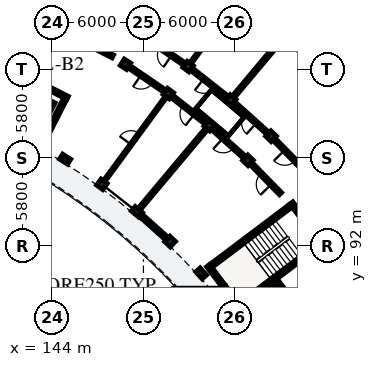
"""IFC4 building model, lengths in metres.
Left out: names, types, materials, properties, quantities, classifications, styles, units other than length and angle.
Written with IfcOpenShell. Run it as: python <this file> out.ifc"""

import sys

from ifc_helpers import new_model, si_unit, direction, frame, frame_2d, origin, origin_2d, place, context, subcontext, project, spatial, rectangle, extrude, element, fill, save


model = new_model("IFC4")
c1 = context("Model", 3, precision=1e-05, world=origin(), true_north=direction((0.0, 1.0)))
c2 = subcontext(c1, "Body", "Model", "MODEL_VIEW")
j1 = project(units=[si_unit("LENGTHUNIT", "METRE"), si_unit("PLANEANGLEUNIT", "RADIAN")], contexts=[c1])
p1 = place(None, origin())
s1 = spatial("IfcSite", under=j1, at=p1, CompositionType="ELEMENT")
p2 = place(p1, origin())
s2 = spatial("IfcBuilding", under=s1, at=p2, CompositionType="ELEMENT")
p3 = place(p2, frame((0.0, 0.0, 29.0)))
s3 = spatial("IfcBuildingStorey", under=s2, at=p3, CompositionType="ELEMENT", Elevation=29.0)
p4 = place(p3, frame((159.707, 94.658, 0.0), z_axis=(0.0, 0.0, 1.0), x_axis=(-0.798639633744, -0.601809550782, 0.0)))
e1 = element("IfcWall", 1, at=p4, inside=s3, PredefinedType="SHEAR", context=c2, shape_type="SweptSolid", body=[
    extrude(rectangle(XDim=6.6, YDim=0.25, at=frame_2d((3.3, 0.0))), origin(), (0.0, 0.0, 1.0), 3.11),
])
p5 = place(p3, frame((154.261, 90.711, 0.0), z_axis=(0.0, 0.0, 1.0), x_axis=(0.601825826579, -0.798627368967, 0.0)))
e2 = element("IfcWall", 2, at=p5, inside=s3, PredefinedType="SHEAR", context=c2, shape_type="SweptSolid", body=[
    extrude(rectangle(XDim=3.42, YDim=0.25, at=frame_2d((1.71, 0.0))), origin(), (0.0, 0.0, 1.0), 3.11),
])
p6 = place(p3, frame((159.731, 94.833, 0.0), z_axis=(0.0, 0.0, 1.0), x_axis=(0.601814606132, -0.798635824294, 0.0)))
e3 = element("IfcWall", 3, at=p6, inside=s3, PredefinedType="SHEAR", context=c2, shape_type="SweptSolid", body=[
    extrude(rectangle(XDim=3.42, YDim=0.25, at=frame_2d((1.71, 0.0))), origin(), (0.0, 0.0, 1.0), 3.11),
])
p7 = place(p3, frame((161.615, 92.126, 0.0), z_axis=(0.0, 0.0, 1.0), x_axis=(-0.798639633744, -0.601809550782, 0.0)))
e4 = element("IfcWall", 4, at=p7, inside=s3, PredefinedType="SHEAR", context=c2, shape_type="SweptSolid", body=[
    extrude(rectangle(XDim=6.6, YDim=0.25, at=frame_2d((3.3, 0.0))), origin(), (0.0, 0.0, 1.0), 3.11),
])
p8 = place(p7, frame((0.22, 0.0, 0.0)))
e5 = element("IfcOpeningElement", 5, at=p8, cuts=e4, PredefinedType="OPENING", context=c2, shape_type="SweptSolid", body=[
    extrude(rectangle(XDim=1.05, YDim=2.15, at=frame_2d((0.525, 1.075))), frame((0.0, 0.135, 0.0), z_axis=(0.0, -1.0, 0.0), x_axis=(1.0, 0.0, 0.0)), (0.0, 0.0, 1.0), 0.27),
])
p9 = place(p3, frame((158.827, 89.619, 0.0), z_axis=(0.0, 0.0, 1.0), x_axis=(0.601819781152, -0.798631924615, 0.0)))
e6 = element("IfcWall", 6, at=p9, inside=s3, PredefinedType="SHEAR", context=c2, shape_type="SweptSolid", body=[
    extrude(rectangle(XDim=3.26, YDim=0.23, at=frame_2d((1.63, 0.0))), origin(), (0.0, 0.0, 1.0), 3.11),
])
p10 = place(p9, frame((0.9, 0.0, 0.0)))
e7 = element("IfcOpeningElement", 7, at=p10, cuts=e6, PredefinedType="OPENING", context=c2, shape_type="SweptSolid", body=[
    extrude(rectangle(XDim=1.1, YDim=2.15, at=frame_2d((0.55, 1.075))), frame((0.0, 0.125, 0.0), z_axis=(0.0, -1.0, 0.0), x_axis=(1.0, 0.0, 0.0)), (0.0, 0.0, 1.0), 0.25),
])
p11 = place(p3, frame((158.805, 89.458, 0.0), z_axis=(0.0, 0.0, 1.0), x_axis=(-0.798608971494, -0.601850239387, 0.0)))
e8 = element("IfcWall", 8, at=p11, inside=s3, PredefinedType="SHEAR", context=c2, shape_type="SweptSolid", body=[
    extrude(rectangle(XDim=2.7, YDim=0.23, at=frame_2d((1.35, 0.0))), origin(), (0.0, 0.0, 1.0), 3.11),
])
p12 = place(p3, frame((142.103, 103.224, 0.0), z_axis=(0.0, 0.0, 1.0), x_axis=(0.891001200497, -0.454000947921, 0.0)))
e9 = element("IfcWall", 9, at=p12, inside=s3, PredefinedType="SHEAR", context=c2, shape_type="SweptSolid", body=[
    extrude(rectangle(XDim=3.26, YDim=0.23, at=frame_2d((1.63, 0.0))), origin(), (0.0, 0.0, 1.0), 3.11),
])
p13 = place(p12, frame((0.9, 0.0, 0.0)))
e10 = element("IfcOpeningElement", 10, at=p13, cuts=e9, PredefinedType="OPENING", context=c2, shape_type="SweptSolid", body=[
    extrude(rectangle(XDim=1.0, YDim=2.15, at=frame_2d((0.5, 1.075))), frame((0.0, 0.125, 0.0), z_axis=(0.0, -1.0, 0.0), x_axis=(1.0, 0.0, 0.0)), (0.0, 0.0, 1.0), 0.25),
])
p14 = place(p3, frame((144.853, 101.694, 0.0), z_axis=(0.0, 0.0, 1.0), x_axis=(-0.454036857101, -0.890982902414, 0.0)))
e11 = element("IfcWall", 11, at=p14, inside=s3, PredefinedType="SHEAR", context=c2, shape_type="SweptSolid", body=[
    extrude(rectangle(XDim=2.7, YDim=0.23, at=frame_2d((1.35, 0.0))), origin(), (0.0, 0.0, 1.0), 3.11),
])
p15 = place(p3, frame((153.801, 90.198, 0.0), z_axis=(0.0, 0.0, 1.0), x_axis=(0.73793204255, 0.674875025896, 0.0)))
e12 = element("IfcColumn", 12, at=p15, inside=s3, PredefinedType="PILASTER", context=c2, shape_type="SweptSolid", body=[
    extrude(rectangle(XDim=0.39, YDim=0.63, at=origin_2d()), origin(), (0.0, 0.0, 1.0), 3.115),
])
for number, where, z_axis, x_axis in (
    (13, (151.753, 92.294, 0.0), (0.0, 0.0, 1.0), (0.692, 0.722, 0.0)),
    (14, (156.873, 97.637, 0.0), (0.0, 0.0, 1.0), (0.692, 0.722, 0.0)),
    (15, (158.395, 99.226, 0.0), (0.0, 0.0, 1.0), (0.692, 0.722, 0.0)),
):
    element("IfcColumn", number, at=place(p3, frame(where, z_axis=z_axis, x_axis=x_axis)), inside=s3, PredefinedType="COLUMN", context=c2, shape_type="SweptSolid", body=[
        extrude(rectangle(XDim=0.5, YDim=0.5, at=origin_2d()), origin(), (0.0, 0.0, 1.0), 3.115),
    ])
p16 = place(p3, frame((149.572, 94.251, 0.0), z_axis=(0.0, 0.0, 1.0), x_axis=(0.642787582947, 0.766044465556, 0.0)))
e16 = element("IfcColumn", 16, at=p16, inside=s3, PredefinedType="PILASTER", context=c2, shape_type="SweptSolid", body=[
    extrude(rectangle(XDim=0.39, YDim=0.63, at=origin_2d()), origin(), (0.0, 0.0, 1.0), 3.115),
])
for number, where, z_axis, x_axis in (
    (17, (154.329, 99.919, 0.0), (0.0, 0.0, 1.0), (0.643, 0.766, 0.0)),
    (18, (155.743, 101.605, 0.0), (0.0, 0.0, 1.0), (0.643, 0.766, 0.0)),
    (19, (147.266, 96.059, 0.0), (0.0, 0.0, 1.0), (0.591, 0.807, 0.0)),
    (20, (151.639, 102.029, 0.0), (0.0, 0.0, 1.0), (0.591, 0.807, 0.0)),
    (21, (152.939, 103.804, 0.0), (0.0, 0.0, 1.0), (0.591, 0.807, 0.0)),
):
    element("IfcColumn", number, at=place(p3, frame(where, z_axis=z_axis, x_axis=x_axis)), inside=s3, PredefinedType="COLUMN", context=c2, shape_type="SweptSolid", body=[
        extrude(rectangle(XDim=0.5, YDim=0.5, at=origin_2d()), origin(), (0.0, 0.0, 1.0), 3.115),
    ])
p17 = place(p3, frame((144.847, 97.712, 0.0), z_axis=(0.0, 0.0, 1.0), x_axis=(0.536481544469, 0.843912052553, 0.0)))
e22 = element("IfcColumn", 22, at=p17, inside=s3, PredefinedType="PILASTER", context=c2, shape_type="SweptSolid", body=[
    extrude(rectangle(XDim=0.39, YDim=0.63, at=origin_2d()), origin(), (0.0, 0.0, 1.0), 3.115),
])
p18 = place(p3, frame((148.817, 103.957, 0.0), z_axis=(0.0, 0.0, 1.0), x_axis=(0.536481544469, 0.843912052553, 0.0)))
e23 = element("IfcColumn", 23, at=p18, inside=s3, PredefinedType="COLUMN", context=c2, shape_type="SweptSolid", body=[
    extrude(rectangle(XDim=0.5, YDim=0.5, at=origin_2d()), origin(), (0.0, 0.0, 1.0), 3.115),
])
p19 = place(p3, frame((162.037, 103.344, 0.0), z_axis=(0.0, 0.0, 1.0), x_axis=(-0.744438243575, 0.667691322021, 0.0)))
e24 = element("IfcWall", 24, at=p19, inside=s3, PredefinedType="SOLIDWALL", context=c2, shape_type="SweptSolid", body=[
    extrude(rectangle(XDim=3.541, YDim=0.24, at=frame_2d((1.77, 0.0))), origin(), (0.0, 0.0, 1.0), 2.355),
])
p20 = place(p19, frame((1.17, 0.0, 0.55)))
e25 = element("IfcOpeningElement", 25, at=p20, cuts=e24, PredefinedType="OPENING", context=c2, shape_type="SweptSolid", body=[
    extrude(rectangle(XDim=1.2, YDim=1.55, at=frame_2d((0.6, 0.775))), frame((0.0, 0.13, 0.0), z_axis=(0.0, -1.0, 0.0), x_axis=(1.0, 0.0, 0.0)), (0.0, 0.0, 1.0), 0.26),
])
p21 = place(p3, frame((151.59, 92.441, 0.0), z_axis=(0.0, 0.0, 1.0), x_axis=(-0.744432975017, 0.667697196121, 0.0)))
e26 = element("IfcWall", 26, at=p21, inside=s3, PredefinedType="SOLIDWALL", context=c2, shape_type="SweptSolid", body=[
    extrude(rectangle(XDim=2.545, YDim=0.24, at=frame_2d((1.272, 0.0))), origin(), (0.0, 0.0, 1.0), 2.355),
])
p22 = place(p21, frame((0.498, 0.0, 0.35)))
e27 = element("IfcOpeningElement", 27, at=p22, cuts=e26, PredefinedType="OPENING", context=c2, shape_type="SweptSolid", body=[
    extrude(rectangle(XDim=1.55, YDim=1.75, at=frame_2d((0.775, 0.875))), frame((0.0, 0.13, 0.0), z_axis=(0.0, -1.0, 0.0), x_axis=(1.0, 0.0, 0.0)), (0.0, 0.0, 1.0), 0.26),
])
p23 = place(p3, frame((143.625, 106.696, 0.0), z_axis=(0.0, 0.0, 1.0), x_axis=(0.891003372311, -0.453996685595, 0.0)))
e28 = element("IfcWall", 28, at=p23, inside=s3, PredefinedType="PARTITIONING", context=c2, shape_type="SweptSolid", body=[
    extrude(rectangle(XDim=4.9, YDim=0.22, at=frame_2d((2.45, 0.0))), origin(), (0.0, 0.0, 1.0), 2.34),
])
p24 = place(p23, frame((1.95, 0.0, 0.0)))
e29 = element("IfcOpeningElement", 29, at=p24, cuts=e28, PredefinedType="OPENING", context=c2, shape_type="SweptSolid", body=[
    extrude(rectangle(XDim=0.98, YDim=2.14, at=frame_2d((0.49, 1.07))), frame((0.0, 0.12, 0.0), z_axis=(0.0, -1.0, 0.0), x_axis=(1.0, 0.0, 0.0)), (0.0, 0.0, 1.0), 0.24),
])
p25 = place(p3, frame((160.641, 96.927, 0.0), z_axis=(0.0, 0.0, 1.0), x_axis=(-0.698787219683, 0.715329589496, 0.0)))
e30 = element("IfcWall", 30, at=p25, inside=s3, PredefinedType="PARTITIONING", context=c2, shape_type="SweptSolid", body=[
    extrude(rectangle(XDim=2.863, YDim=0.205, at=frame_2d((1.432, 0.0))), origin(), (0.0, 0.0, 1.0), 2.37),
])
p26 = place(p25, frame((0.937, 0.0, 0.0)))
e31 = element("IfcOpeningElement", 31, at=p26, cuts=e30, PredefinedType="OPENING", context=c2, shape_type="SweptSolid", body=[
    extrude(rectangle(XDim=0.99, YDim=2.16, at=frame_2d((0.495, 1.08))), frame((0.0, 0.113, 0.0), z_axis=(0.0, -1.0, 0.0), x_axis=(1.0, 0.0, 0.0)), (0.0, 0.0, 1.0), 0.225),
])
p27 = place(p3, frame((159.017, 95.443, 0.0), z_axis=(0.0, 0.0, 1.0), x_axis=(-0.698840007829, 0.715278018296, 0.0)))
e32 = element("IfcWall", 32, at=p27, inside=s3, PredefinedType="PARTITIONING", context=c2, shape_type="SweptSolid", body=[
    extrude(rectangle(XDim=2.718, YDim=0.205, at=frame_2d((1.359, 0.0))), origin(), (0.0, 0.0, 1.0), 2.37),
])
p28 = place(p27, frame((0.864, 0.0, 0.0)))
e33 = element("IfcOpeningElement", 33, at=p28, cuts=e32, PredefinedType="OPENING", context=c2, shape_type="SweptSolid", body=[
    extrude(rectangle(XDim=0.99, YDim=2.16, at=frame_2d((0.495, 1.08))), frame((0.0, 0.113, 0.0), z_axis=(0.0, -1.0, 0.0), x_axis=(1.0, 0.0, 0.0)), (0.0, 0.0, 1.0), 0.225),
])
p29 = place(p3, frame((158.135, 99.459, 0.0), z_axis=(0.0, 0.0, 1.0), x_axis=(-0.744433521088, 0.667696587291, 0.0)))
e34 = element("IfcWall", 34, at=p29, inside=s3, PredefinedType="PARTITIONING", context=c2, shape_type="SweptSolid", body=[
    extrude(rectangle(XDim=2.863, YDim=0.205, at=frame_2d((1.432, 0.0))), origin(), (0.0, 0.0, 1.0), 2.37),
])
p30 = place(p29, frame((0.947, 0.0, 0.0)))
e35 = element("IfcOpeningElement", 35, at=p30, cuts=e34, PredefinedType="OPENING", context=c2, shape_type="SweptSolid", body=[
    extrude(rectangle(XDim=0.97, YDim=2.15, at=frame_2d((0.485, 1.075))), frame((0.0, 0.113, 0.0), z_axis=(0.0, -1.0, 0.0), x_axis=(1.0, 0.0, 0.0)), (0.0, 0.0, 1.0), 0.225),
])
p31 = place(p3, frame((156.613, 97.871, 0.0), z_axis=(0.0, 0.0, 1.0), x_axis=(-0.744418559135, 0.667713268413, 0.0)))
e36 = element("IfcWall", 36, at=p31, inside=s3, PredefinedType="PARTITIONING", context=c2, shape_type="SweptSolid", body=[
    extrude(rectangle(XDim=2.718, YDim=0.205, at=frame_2d((1.359, 0.0))), origin(), (0.0, 0.0, 1.0), 2.37),
])
p32 = place(p31, frame((0.874, 0.0, 0.0)))
e37 = element("IfcOpeningElement", 37, at=p32, cuts=e36, PredefinedType="OPENING", context=c2, shape_type="SweptSolid", body=[
    extrude(rectangle(XDim=0.97, YDim=2.15, at=frame_2d((0.485, 1.075))), frame((0.0, 0.113, 0.0), z_axis=(0.0, -1.0, 0.0), x_axis=(1.0, 0.0, 0.0)), (0.0, 0.0, 1.0), 0.225),
])
p33 = place(p3, frame((156.0, 101.911, 0.0), z_axis=(0.0, 0.0, 1.0), x_axis=(0.642811926223, 0.766024038465, 0.0)))
e38 = element("IfcWall", 38, at=p33, inside=s3, PredefinedType="PARTITIONING", context=c2, shape_type="SweptSolid", body=[
    extrude(rectangle(XDim=4.7, YDim=0.185, at=frame_2d((2.35, 0.0))), origin(), (0.0, 0.0, 1.0), 2.37),
])
p34 = place(p3, frame((149.829, 94.557, 0.0), z_axis=(0.0, 0.0, 1.0), x_axis=(0.642789470807, 0.766042881449, 0.0)))
e39 = element("IfcWall", 39, at=p34, inside=s3, PredefinedType="PARTITIONING", context=c2, shape_type="SweptSolid", body=[
    extrude(rectangle(XDim=6.6, YDim=0.185, at=frame_2d((3.3, 0.0))), origin(), (0.0, 0.0, 1.0), 2.37),
])
p35 = place(p3, frame((155.467, 101.821, 0.0), z_axis=(0.0, 0.0, 1.0), x_axis=(-0.786806323554, 0.617199975061, 0.0)))
e40 = element("IfcWall", 40, at=p35, inside=s3, PredefinedType="PARTITIONING", context=c2, shape_type="SweptSolid", body=[
    extrude(rectangle(XDim=2.863, YDim=0.205, at=frame_2d((1.432, 0.0))), origin(), (0.0, 0.0, 1.0), 2.37),
])
p36 = place(p35, frame((0.957, 0.0, 0.0)))
e41 = element("IfcOpeningElement", 41, at=p36, cuts=e40, PredefinedType="OPENING", context=c2, shape_type="SweptSolid", body=[
    extrude(rectangle(XDim=0.95, YDim=2.13, at=frame_2d((0.475, 1.065))), frame((0.0, 0.113, 0.0), z_axis=(0.0, -1.0, 0.0), x_axis=(1.0, 0.0, 0.0)), (0.0, 0.0, 1.0), 0.225),
])
p37 = place(p3, frame((154.053, 100.135, 0.0), z_axis=(0.0, 0.0, 1.0), x_axis=(-0.786835457019, 0.617162833924, 0.0)))
e42 = element("IfcWall", 42, at=p37, inside=s3, PredefinedType="PARTITIONING", context=c2, shape_type="SweptSolid", body=[
    extrude(rectangle(XDim=2.718, YDim=0.205, at=frame_2d((1.359, 0.0))), origin(), (0.0, 0.0, 1.0), 2.37),
])
p38 = place(p37, frame((0.884, 0.0, 0.0)))
e43 = element("IfcOpeningElement", 43, at=p38, cuts=e42, PredefinedType="OPENING", context=c2, shape_type="SweptSolid", body=[
    extrude(rectangle(XDim=0.95, YDim=2.13, at=frame_2d((0.475, 1.065))), frame((0.0, 0.113, 0.0), z_axis=(0.0, -1.0, 0.0), x_axis=(1.0, 0.0, 0.0)), (0.0, 0.0, 1.0), 0.225),
])
p39 = place(p3, frame((153.176, 104.126, 0.0), z_axis=(0.0, 0.0, 1.0), x_axis=(0.590910940129, 0.806736797745, 0.0)))
e44 = element("IfcWall", 44, at=p39, inside=s3, PredefinedType="PARTITIONING", context=c2, shape_type="SweptSolid", body=[
    extrude(rectangle(XDim=4.7, YDim=0.125, at=frame_2d((2.35, 0.0))), origin(), (0.0, 0.0, 1.0), 2.37),
])
p40 = place(p39, frame((1.915, 0.0, 0.0)))
e45 = element("IfcOpeningElement", 45, at=p40, cuts=e44, PredefinedType="OPENING", context=c2, shape_type="SweptSolid", body=[
    extrude(rectangle(XDim=0.87, YDim=2.08, at=frame_2d((0.435, 1.04))), frame((0.0, 0.073, 0.0), z_axis=(0.0, -1.0, 0.0), x_axis=(1.0, 0.0, 0.0)), (0.0, 0.0, 1.0), 0.145),
])
p41 = place(p3, frame((147.503, 96.382, 0.0), z_axis=(0.0, 0.0, 1.0), x_axis=(0.590924179316, 0.806727100263, 0.0)))
e46 = element("IfcWall", 46, at=p41, inside=s3, PredefinedType="PARTITIONING", context=c2, shape_type="SweptSolid", body=[
    extrude(rectangle(XDim=6.6, YDim=0.125, at=frame_2d((3.3, 0.0))), origin(), (0.0, 0.0, 1.0), 2.37),
])
p42 = place(p41, frame((2.845, 0.0, 0.0)))
e47 = element("IfcOpeningElement", 47, at=p42, cuts=e46, PredefinedType="OPENING", context=c2, shape_type="SweptSolid", body=[
    extrude(rectangle(XDim=0.91, YDim=2.1, at=frame_2d((0.455, 1.05))), frame((0.0, 0.073, 0.0), z_axis=(0.0, -1.0, 0.0), x_axis=(1.0, 0.0, 0.0)), (0.0, 0.0, 1.0), 0.145),
])
p43 = place(p3, frame((152.65, 104.001, 0.0), z_axis=(0.0, 0.0, 1.0), x_axis=(-0.825779671787, 0.563992848947, 0.0)))
e48 = element("IfcWall", 48, at=p43, inside=s3, PredefinedType="PARTITIONING", context=c2, shape_type="SweptSolid", body=[
    extrude(rectangle(XDim=2.863, YDim=0.205, at=frame_2d((1.432, 0.0))), origin(), (0.0, 0.0, 1.0), 2.37),
])
p44 = place(p43, frame((0.967, 0.0, 0.0)))
e49 = element("IfcOpeningElement", 49, at=p44, cuts=e48, PredefinedType="OPENING", context=c2, shape_type="SweptSolid", body=[
    extrude(rectangle(XDim=0.93, YDim=2.12, at=frame_2d((0.465, 1.06))), frame((0.0, 0.113, 0.0), z_axis=(0.0, -1.0, 0.0), x_axis=(1.0, 0.0, 0.0)), (0.0, 0.0, 1.0), 0.225),
])
p45 = place(p3, frame((151.35, 102.226, 0.0), z_axis=(0.0, 0.0, 1.0), x_axis=(-0.825752009056, 0.56403334967, 0.0)))
e50 = element("IfcWall", 50, at=p45, inside=s3, PredefinedType="PARTITIONING", context=c2, shape_type="SweptSolid", body=[
    extrude(rectangle(XDim=2.718, YDim=0.205, at=frame_2d((1.359, 0.0))), origin(), (0.0, 0.0, 1.0), 2.37),
])
p46 = place(p45, frame((0.894, 0.0, 0.0)))
e51 = element("IfcOpeningElement", 51, at=p46, cuts=e50, PredefinedType="OPENING", context=c2, shape_type="SweptSolid", body=[
    extrude(rectangle(XDim=0.93, YDim=2.12, at=frame_2d((0.465, 1.06))), frame((0.0, 0.113, 0.0), z_axis=(0.0, -1.0, 0.0), x_axis=(1.0, 0.0, 0.0)), (0.0, 0.0, 1.0), 0.225),
])
p47 = place(p22, origin())
e52 = element("IfcWindow", 52, at=p47, inside=s3, PartitioningType="SINGLE_PANEL", PredefinedType="WINDOW", context=c2, shape_type="SweptSolid", body=[
    extrude(rectangle(XDim=1.55, YDim=1.75, at=frame_2d((0.775, 0.875))), frame((0.0, 0.03, 0.0), z_axis=(0.0, -1.0, 0.0), x_axis=(1.0, 0.0, 0.0)), (0.0, 0.0, 1.0), 0.06),
])
fill(e27, e52)
p48 = place(p26, origin())
e53 = element("IfcDoor", 53, at=p48, inside=s3, OperationType="SINGLE_SWING_RIGHT", PredefinedType="DOOR", context=c2, shape_type="SweptSolid", body=[
    extrude(rectangle(XDim=0.99, YDim=2.16, at=frame_2d((0.495, 1.08))), frame((0.0, 0.025, 0.0), z_axis=(0.0, -1.0, 0.0), x_axis=(1.0, 0.0, 0.0)), (0.0, 0.0, 1.0), 0.05),
])
fill(e31, e53)
p49 = place(p28, origin())
e54 = element("IfcDoor", 54, at=p49, inside=s3, OperationType="SINGLE_SWING_LEFT", PredefinedType="DOOR", context=c2, shape_type="SweptSolid", body=[
    extrude(rectangle(XDim=0.99, YDim=2.16, at=frame_2d((0.495, 1.08))), frame((0.0, 0.025, 0.0), z_axis=(0.0, -1.0, 0.0), x_axis=(1.0, 0.0, 0.0)), (0.0, 0.0, 1.0), 0.05),
])
fill(e33, e54)
p50 = place(p30, origin())
e55 = element("IfcDoor", 55, at=p50, inside=s3, OperationType="SINGLE_SWING_LEFT", PredefinedType="DOOR", context=c2, shape_type="SweptSolid", body=[
    extrude(rectangle(XDim=0.97, YDim=2.15, at=frame_2d((0.485, 1.075))), frame((0.0, 0.025, 0.0), z_axis=(0.0, -1.0, 0.0), x_axis=(1.0, 0.0, 0.0)), (0.0, 0.0, 1.0), 0.05),
])
fill(e35, e55)
p51 = place(p32, origin())
e56 = element("IfcDoor", 56, at=p51, inside=s3, OperationType="SINGLE_SWING_RIGHT", PredefinedType="DOOR", context=c2, shape_type="SweptSolid", body=[
    extrude(rectangle(XDim=0.97, YDim=2.15, at=frame_2d((0.485, 1.075))), frame((0.0, 0.025, 0.0), z_axis=(0.0, -1.0, 0.0), x_axis=(1.0, 0.0, 0.0)), (0.0, 0.0, 1.0), 0.05),
])
fill(e37, e56)
p52 = place(p36, origin())
e57 = element("IfcDoor", 57, at=p52, inside=s3, OperationType="SINGLE_SWING_RIGHT", PredefinedType="DOOR", context=c2, shape_type="SweptSolid", body=[
    extrude(rectangle(XDim=0.95, YDim=2.13, at=frame_2d((0.475, 1.065))), frame((0.0, 0.025, 0.0), z_axis=(0.0, -1.0, 0.0), x_axis=(1.0, 0.0, 0.0)), (0.0, 0.0, 1.0), 0.05),
])
fill(e41, e57)
p53 = place(p38, origin())
e58 = element("IfcDoor", 58, at=p53, inside=s3, OperationType="SINGLE_SWING_LEFT", PredefinedType="DOOR", context=c2, shape_type="SweptSolid", body=[
    extrude(rectangle(XDim=0.95, YDim=2.13, at=frame_2d((0.475, 1.065))), frame((0.0, 0.025, 0.0), z_axis=(0.0, -1.0, 0.0), x_axis=(1.0, 0.0, 0.0)), (0.0, 0.0, 1.0), 0.05),
])
fill(e43, e58)
p54 = place(p42, origin())
e59 = element("IfcDoor", 59, at=p54, inside=s3, OperationType="SINGLE_SWING_LEFT", PredefinedType="DOOR", context=c2, shape_type="SweptSolid", body=[
    extrude(rectangle(XDim=0.91, YDim=2.1, at=frame_2d((0.455, 1.05))), frame((0.0, 0.025, 0.0), z_axis=(0.0, -1.0, 0.0), x_axis=(1.0, 0.0, 0.0)), (0.0, 0.0, 1.0), 0.05),
])
fill(e47, e59)
p55 = place(p44, origin())
e60 = element("IfcDoor", 60, at=p55, inside=s3, OperationType="SINGLE_SWING_LEFT", PredefinedType="DOOR", context=c2, shape_type="SweptSolid", body=[
    extrude(rectangle(XDim=0.93, YDim=2.12, at=frame_2d((0.465, 1.06))), frame((0.0, 0.025, 0.0), z_axis=(0.0, -1.0, 0.0), x_axis=(1.0, 0.0, 0.0)), (0.0, 0.0, 1.0), 0.05),
])
fill(e49, e60)
p56 = place(p46, origin())
e61 = element("IfcDoor", 61, at=p56, inside=s3, OperationType="SINGLE_SWING_RIGHT", PredefinedType="DOOR", context=c2, shape_type="SweptSolid", body=[
    extrude(rectangle(XDim=0.93, YDim=2.12, at=frame_2d((0.465, 1.06))), frame((0.0, 0.025, 0.0), z_axis=(0.0, -1.0, 0.0), x_axis=(1.0, 0.0, 0.0)), (0.0, 0.0, 1.0), 0.05),
])
fill(e51, e61)
save(model, sys.argv[1])
